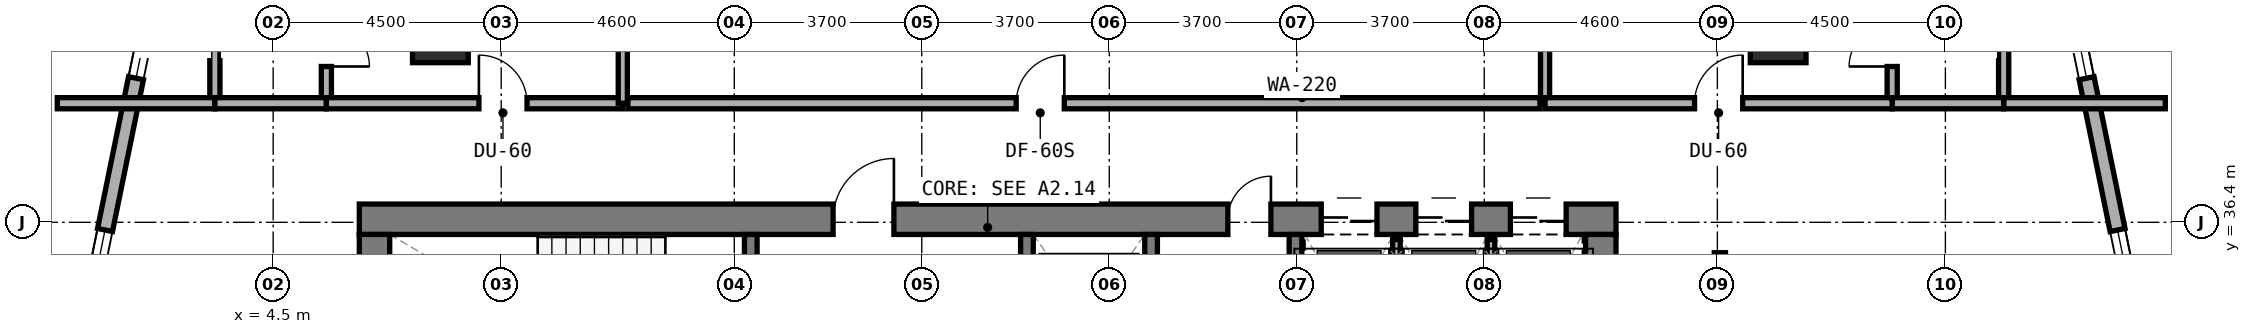
"""IFC4 building model, lengths in metres.
Left out: names, types, materials, properties, quantities, classifications, styles, units other than length and angle.
Written with IfcOpenShell. Run it as: python <this file> out.ifc"""

import sys

from ifc_helpers import new_model, si_unit, direction, frame, frame_2d, origin, origin_2d, place, context, subcontext, project, spatial, rectangle, extrude, element, fill, save


model = new_model("IFC4")
c1 = context("Model", 3, precision=1e-05, world=origin(), true_north=direction((0.0, 1.0)))
c2 = subcontext(c1, "Body", "Model", "MODEL_VIEW")
j1 = project(units=[si_unit("LENGTHUNIT", "METRE"), si_unit("PLANEANGLEUNIT", "RADIAN")], contexts=[c1])
p1 = place(None, origin())
s1 = spatial("IfcSite", under=j1, at=p1, CompositionType="ELEMENT")
p2 = place(p1, origin())
s2 = spatial("IfcBuilding", under=s1, at=p2, CompositionType="ELEMENT")
p3 = place(p2, frame((0.0, 0.0, 52.0)))
s3 = spatial("IfcBuildingStorey", under=s2, at=p3, CompositionType="ELEMENT", Elevation=52.0)
p4 = place(p3, frame((6.2, 36.46, 0.0), z_axis=(0.0, 0.0, 1.0), x_axis=(1.0, 0.0, 0.0)))
e1 = element("IfcWall", 1, at=p4, inside=s3, PredefinedType="SHEAR", context=c2, shape_type="SweptSolid", body=[
    extrude(rectangle(XDim=24.8, YDim=0.6, at=frame_2d((12.4, 0.0))), origin(), (0.0, 0.0, 1.0), 3.5),
])
p5 = place(p4, frame((9.35, 0.0, 0.0)))
e2 = element("IfcOpeningElement", 2, at=p5, cuts=e1, PredefinedType="OPENING", context=c2, shape_type="SweptSolid", body=[
    extrude(rectangle(XDim=1.2, YDim=2.15, at=frame_2d((0.6, 1.075))), frame((0.0, 0.31, 0.0), z_axis=(0.0, -1.0, 0.0), x_axis=(1.0, 0.0, 0.0)), (0.0, 0.0, 1.0), 0.62),
])
p6 = place(p4, frame((17.14, 0.0, 0.0)))
e3 = element("IfcOpeningElement", 3, at=p6, cuts=e1, PredefinedType="OPENING", context=c2, shape_type="SweptSolid", body=[
    extrude(rectangle(XDim=0.85, YDim=2.1, at=frame_2d((0.425, 1.05))), frame((0.0, 0.31, 0.0), z_axis=(0.0, -1.0, 0.0), x_axis=(1.0, 0.0, 0.0)), (0.0, 0.0, 1.0), 0.62),
])
p7 = place(p4, frame((18.983, 0.0, 0.0)))
e4 = element("IfcOpeningElement", 4, at=p7, cuts=e1, PredefinedType="OPENING", context=c2, shape_type="SweptSolid", body=[
    extrude(rectangle(XDim=1.1, YDim=2.15, at=frame_2d((0.55, 1.075))), frame((0.0, 0.31, 0.0), z_axis=(0.0, -1.0, 0.0), x_axis=(1.0, 0.0, 0.0)), (0.0, 0.0, 1.0), 0.62),
])
p8 = place(p4, frame((20.85, 0.0, 0.0)))
e5 = element("IfcOpeningElement", 5, at=p8, cuts=e1, PredefinedType="OPENING", context=c2, shape_type="SweptSolid", body=[
    extrude(rectangle(XDim=1.1, YDim=2.15, at=frame_2d((0.55, 1.075))), frame((0.0, 0.31, 0.0), z_axis=(0.0, -1.0, 0.0), x_axis=(1.0, 0.0, 0.0)), (0.0, 0.0, 1.0), 0.62),
])
p9 = place(p4, frame((22.716, 0.0, 0.0)))
e6 = element("IfcOpeningElement", 6, at=p9, cuts=e1, PredefinedType="OPENING", context=c2, shape_type="SweptSolid", body=[
    extrude(rectangle(XDim=1.1, YDim=2.15, at=frame_2d((0.55, 1.075))), frame((0.0, 0.31, 0.0), z_axis=(0.0, -1.0, 0.0), x_axis=(1.0, 0.0, 0.0)), (0.0, 0.0, 1.0), 0.62),
])
for number, where, z_axis, x_axis in (
    (7, (6.5, 33.0, 0.0), (0.0, 0.0, 1.0), (0.0, 1.0, 0.0)),
    (8, (30.7, 33.0, 0.0), (0.0, 0.0, 1.0), (0.0, 1.0, 0.0)),
):
    element("IfcWall", number, at=place(p3, frame(where, z_axis=z_axis, x_axis=x_axis)), inside=s3, PredefinedType="SHEAR", context=c2, shape_type="SweptSolid", body=[
        extrude(rectangle(XDim=3.16, YDim=0.6, at=frame_2d((1.58, 0.0))), origin(), (0.0, 0.0, 1.0), 3.5),
    ])
p10 = place(p3, frame((13.925, 33.0, 0.0), z_axis=(0.0, 0.0, 1.0), x_axis=(0.0, 1.0, 0.0)))
e9 = element("IfcWall", 9, at=p10, inside=s3, PredefinedType="STANDARD", context=c2, shape_type="SweptSolid", body=[
    extrude(rectangle(XDim=3.16, YDim=0.25, at=frame_2d((1.58, 0.0))), origin(), (0.0, 0.0, 1.0), 3.22),
])
p11 = place(p10, frame((0.98, 0.0, 0.0)))
e10 = element("IfcOpeningElement", 10, at=p11, cuts=e9, PredefinedType="OPENING", context=c2, shape_type="SweptSolid", body=[
    extrude(rectangle(XDim=1.1, YDim=2.15, at=frame_2d((0.55, 1.075))), frame((0.0, 0.135, 0.0), z_axis=(0.0, -1.0, 0.0), x_axis=(1.0, 0.0, 0.0)), (0.0, 0.0, 1.0), 0.27),
])
p12 = place(p3, frame((19.375, 33.0, 0.0), z_axis=(0.0, 0.0, 1.0), x_axis=(0.0, 1.0, 0.0)))
e11 = element("IfcWall", 11, at=p12, inside=s3, PredefinedType="STANDARD", context=c2, shape_type="SweptSolid", body=[
    extrude(rectangle(XDim=3.16, YDim=0.25, at=frame_2d((1.58, 0.0))), origin(), (0.0, 0.0, 1.0), 3.22),
])
p13 = place(p12, frame((0.98, 0.0, 0.0)))
e12 = element("IfcOpeningElement", 12, at=p13, cuts=e11, PredefinedType="OPENING", context=c2, shape_type="SweptSolid", body=[
    extrude(rectangle(XDim=1.1, YDim=2.15, at=frame_2d((0.55, 1.075))), frame((0.0, 0.135, 0.0), z_axis=(0.0, -1.0, 0.0), x_axis=(1.0, 0.0, 0.0)), (0.0, 0.0, 1.0), 0.27),
])
for number, where, z_axis, x_axis in (
    (13, (21.825, 33.0, 0.0), (0.0, 0.0, 1.0), (0.0, 1.0, 0.0)),
    (14, (24.675, 33.0, 0.0), (0.0, 0.0, 1.0), (0.0, 1.0, 0.0)),
):
    element("IfcWall", number, at=place(p3, frame(where, z_axis=z_axis, x_axis=x_axis)), inside=s3, PredefinedType="STANDARD", context=c2, shape_type="SweptSolid", body=[
        extrude(rectangle(XDim=3.16, YDim=0.25, at=frame_2d((1.58, 0.0))), origin(), (0.0, 0.0, 1.0), 3.22),
    ])
for number, where, z_axis, x_axis in (
    (15, (34.2, 40.2, 0.0), (0.0, 0.0, 1.0), (1.0, 0.0, 0.0)),
    (16, (7.8, 40.2, 0.0), (0.0, 0.0, 1.0), (1.0, 0.0, 0.0)),
):
    element("IfcColumn", number, at=place(p3, frame(where, z_axis=z_axis, x_axis=x_axis)), inside=s3, PredefinedType="COLUMN", context=c2, shape_type="SweptSolid", body=[
        extrude(rectangle(XDim=1.1, YDim=1.3, at=origin_2d()), origin(), (0.0, 0.0, 1.0), 3.5),
    ])
p14 = place(p3, frame((41.864, 31.516, 0.0), z_axis=(0.0, 0.0, 1.0), x_axis=(-0.199990901713, 0.979797754249, 0.0)))
e17 = element("IfcWall", 17, at=p14, inside=s3, PredefinedType="STANDARD", context=c2, shape_type="SweptSolid", body=[
    extrude(rectangle(XDim=10.065, YDim=0.3, at=frame_2d((5.033, 0.0))), origin(), (0.0, 0.0, 1.0), 3.22),
])
p15 = place(p14, frame((2.429, 0.0, 0.8)))
e18 = element("IfcOpeningElement", 18, at=p15, cuts=e17, PredefinedType="OPENING", context=c2, shape_type="SweptSolid", body=[
    extrude(rectangle(XDim=2.4, YDim=1.6, at=frame_2d((1.2, 0.8))), frame((0.0, 0.16, 0.0), z_axis=(0.0, -1.0, 0.0), x_axis=(1.0, 0.0, 0.0)), (0.0, 0.0, 1.0), 0.32),
])
p16 = place(p14, frame((7.887, 0.0, 0.85)))
e19 = element("IfcOpeningElement", 19, at=p16, cuts=e17, PredefinedType="OPENING", context=c2, shape_type="SweptSolid", body=[
    extrude(rectangle(XDim=1.8, YDim=1.5, at=frame_2d((0.9, 0.75))), frame((0.0, 0.16, 0.0), z_axis=(0.0, -1.0, 0.0), x_axis=(1.0, 0.0, 0.0)), (0.0, 0.0, 1.0), 0.32),
])
p17 = place(p3, frame((2.229, 41.378, 0.0), z_axis=(0.0, 0.0, 1.0), x_axis=(-0.199990901713, -0.979797754249, 0.0)))
e20 = element("IfcWall", 20, at=p17, inside=s3, PredefinedType="STANDARD", context=c2, shape_type="SweptSolid", body=[
    extrude(rectangle(XDim=10.065, YDim=0.3, at=frame_2d((5.033, 0.0))), origin(), (0.0, 0.0, 1.0), 3.22),
])
p18 = place(p17, frame((0.378, 0.0, 0.85)))
e21 = element("IfcOpeningElement", 21, at=p18, cuts=e20, PredefinedType="OPENING", context=c2, shape_type="SweptSolid", body=[
    extrude(rectangle(XDim=1.8, YDim=1.5, at=frame_2d((0.9, 0.75))), frame((0.0, 0.16, 0.0), z_axis=(0.0, -1.0, 0.0), x_axis=(1.0, 0.0, 0.0)), (0.0, 0.0, 1.0), 0.32),
])
p19 = place(p17, frame((5.236, 0.0, 0.8)))
e22 = element("IfcOpeningElement", 22, at=p19, cuts=e20, PredefinedType="OPENING", context=c2, shape_type="SweptSolid", body=[
    extrude(rectangle(XDim=2.4, YDim=1.6, at=frame_2d((1.2, 0.8))), frame((0.0, 0.16, 0.0), z_axis=(0.0, -1.0, 0.0), x_axis=(1.0, 0.0, 0.0)), (0.0, 0.0, 1.0), 0.32),
])
p20 = place(p3, frame((26.667, 33.1, 0.0), z_axis=(0.0, 0.0, 1.0), x_axis=(0.0, 1.0, 0.0)))
e23 = element("IfcWall", 23, at=p20, inside=s3, PredefinedType="PARTITIONING", context=c2, shape_type="SweptSolid", body=[
    extrude(rectangle(XDim=2.96, YDim=0.15, at=frame_2d((1.48, 0.0))), origin(), (0.0, 0.0, 1.0), 3.22),
])
p21 = place(p3, frame((28.533, 33.1, 0.0), z_axis=(0.0, 0.0, 1.0), x_axis=(0.0, 1.0, 0.0)))
e24 = element("IfcWall", 24, at=p21, inside=s3, PredefinedType="PARTITIONING", context=c2, shape_type="SweptSolid", body=[
    extrude(rectangle(XDim=2.96, YDim=0.15, at=frame_2d((1.48, 0.0))), origin(), (0.0, 0.0, 1.0), 2.395),
])
p22 = place(p3, frame((5.55, 38.85, 0.0), z_axis=(0.0, 0.0, 1.0), x_axis=(0.0, 1.0, 0.0)))
e25 = element("IfcWall", 25, at=p22, inside=s3, PredefinedType="PLUMBINGWALL", context=c2, shape_type="SweptSolid", body=[
    extrude(rectangle(XDim=2.1, YDim=0.2, at=frame_2d((1.05, 0.0))), origin(), (0.0, 0.0, 1.0), 3.22),
])
p23 = place(p22, frame((0.625, 0.0, 0.0)))
e26 = element("IfcOpeningElement", 26, at=p23, cuts=e25, PredefinedType="OPENING", context=c2, shape_type="SweptSolid", body=[
    extrude(rectangle(XDim=0.85, YDim=2.1, at=frame_2d((0.425, 1.05))), frame((0.0, 0.11, 0.0), z_axis=(0.0, -1.0, 0.0), x_axis=(1.0, 0.0, 0.0)), (0.0, 0.0, 1.0), 0.22),
])
p24 = place(p3, frame((3.35, 38.85, 0.0), z_axis=(0.0, 0.0, 1.0), x_axis=(0.0, 1.0, 0.0)))
e27 = element("IfcWall", 27, at=p24, inside=s3, PredefinedType="PLUMBINGWALL", context=c2, shape_type="SweptSolid", body=[
    extrude(rectangle(XDim=2.1, YDim=0.2, at=frame_2d((1.05, 0.0))), origin(), (0.0, 0.0, 1.0), 3.22),
])
p25 = place(p3, frame((0.24, 38.75, 0.0), z_axis=(0.0, 0.0, 1.0), x_axis=(1.0, 0.0, 0.0)))
e28 = element("IfcWall", 28, at=p25, inside=s3, PredefinedType="SOLIDWALL", context=c2, shape_type="SweptSolid", body=[
    extrude(rectangle(XDim=3.11, YDim=0.22, at=frame_2d((1.555, 0.0))), origin(), (0.0, 0.0, 1.0), 3.22),
])
p26 = place(p3, frame((3.35, 38.75, 0.0), z_axis=(0.0, 0.0, 1.0), x_axis=(1.0, 0.0, 0.0)))
e29 = element("IfcWall", 29, at=p26, inside=s3, PredefinedType="SOLIDWALL", context=c2, shape_type="SweptSolid", body=[
    extrude(rectangle(XDim=2.2, YDim=0.22, at=frame_2d((1.1, 0.0))), origin(), (0.0, 0.0, 1.0), 3.22),
])
p27 = place(p3, frame((5.55, 38.75, 0.0), z_axis=(0.0, 0.0, 1.0), x_axis=(1.0, 0.0, 0.0)))
e30 = element("IfcWall", 30, at=p27, inside=s3, PredefinedType="SOLIDWALL", context=c2, shape_type="SweptSolid", body=[
    extrude(rectangle(XDim=5.85, YDim=0.22, at=frame_2d((2.925, 0.0))), origin(), (0.0, 0.0, 1.0), 2.395),
])
p28 = place(p27, frame((3.01, 0.0, 0.0)))
e31 = element("IfcOpeningElement", 31, at=p28, cuts=e30, PredefinedType="OPENING", context=c2, shape_type="SweptSolid", body=[
    extrude(rectangle(XDim=0.95, YDim=2.1, at=frame_2d((0.475, 1.05))), frame((0.0, 0.12, 0.0), z_axis=(0.0, -1.0, 0.0), x_axis=(1.0, 0.0, 0.0)), (0.0, 0.0, 1.0), 0.24),
])
p29 = place(p3, frame((11.4, 38.75, 0.0), z_axis=(0.0, 0.0, 1.0), x_axis=(0.0, 1.0, 0.0)))
e32 = element("IfcWall", 32, at=p29, inside=s3, PredefinedType="SOLIDWALL", context=c2, shape_type="SweptSolid", body=[
    extrude(rectangle(XDim=7.45, YDim=0.18, at=frame_2d((3.725, 0.0))), origin(), (0.0, 0.0, 1.0), 2.745),
])
p30 = place(p3, frame((11.5, 38.75, 0.0), z_axis=(0.0, 0.0, 1.0), x_axis=(1.0, 0.0, 0.0)))
e33 = element("IfcWall", 33, at=p30, inside=s3, PredefinedType="SOLIDWALL", context=c2, shape_type="SweptSolid", body=[
    extrude(rectangle(XDim=18.0, YDim=0.22, at=frame_2d((9.0, 0.0))), origin(), (0.0, 0.0, 1.0), 2.395),
])
p31 = place(p30, frame((7.663, 0.0, 0.0)))
e34 = element("IfcOpeningElement", 34, at=p31, cuts=e33, PredefinedType="OPENING", context=c2, shape_type="SweptSolid", body=[
    extrude(rectangle(XDim=0.95, YDim=2.1, at=frame_2d((0.475, 1.05))), frame((0.0, 0.12, 0.0), z_axis=(0.0, -1.0, 0.0), x_axis=(1.0, 0.0, 0.0)), (0.0, 0.0, 1.0), 0.24),
])
p32 = place(p3, frame((29.6, 38.75, 0.0), z_axis=(0.0, 0.0, 1.0), x_axis=(0.0, 1.0, 0.0)))
e35 = element("IfcWall", 35, at=p32, inside=s3, PredefinedType="SOLIDWALL", context=c2, shape_type="SweptSolid", body=[
    extrude(rectangle(XDim=7.688, YDim=0.18, at=frame_2d((3.844, 0.0))), origin(), (0.0, 0.0, 1.0), 2.745),
])
p33 = place(p3, frame((36.45, 38.85, 0.0), z_axis=(0.0, 0.0, 1.0), x_axis=(0.0, 1.0, 0.0)))
e36 = element("IfcWall", 36, at=p33, inside=s3, PredefinedType="PLUMBINGWALL", context=c2, shape_type="SweptSolid", body=[
    extrude(rectangle(XDim=2.1, YDim=0.2, at=frame_2d((1.05, 0.0))), origin(), (0.0, 0.0, 1.0), 3.22),
])
p34 = place(p33, frame((0.625, 0.0, 0.0)))
e37 = element("IfcOpeningElement", 37, at=p34, cuts=e36, PredefinedType="OPENING", context=c2, shape_type="SweptSolid", body=[
    extrude(rectangle(XDim=0.85, YDim=2.1, at=frame_2d((0.425, 1.05))), frame((0.0, 0.11, 0.0), z_axis=(0.0, -1.0, 0.0), x_axis=(1.0, 0.0, 0.0)), (0.0, 0.0, 1.0), 0.22),
])
p35 = place(p3, frame((38.65, 38.85, 0.0), z_axis=(0.0, 0.0, 1.0), x_axis=(0.0, 1.0, 0.0)))
e38 = element("IfcWall", 38, at=p35, inside=s3, PredefinedType="PLUMBINGWALL", context=c2, shape_type="SweptSolid", body=[
    extrude(rectangle(XDim=2.1, YDim=0.2, at=frame_2d((1.05, 0.0))), origin(), (0.0, 0.0, 1.0), 3.22),
])
p36 = place(p3, frame((38.65, 38.75, 0.0), z_axis=(0.0, 0.0, 1.0), x_axis=(1.0, 0.0, 0.0)))
e39 = element("IfcWall", 39, at=p36, inside=s3, PredefinedType="SOLIDWALL", context=c2, shape_type="SweptSolid", body=[
    extrude(rectangle(XDim=3.19, YDim=0.22, at=frame_2d((1.595, 0.0))), origin(), (0.0, 0.0, 1.0), 3.22),
])
p37 = place(p3, frame((36.45, 38.75, 0.0), z_axis=(0.0, 0.0, 1.0), x_axis=(1.0, 0.0, 0.0)))
e40 = element("IfcWall", 40, at=p37, inside=s3, PredefinedType="SOLIDWALL", context=c2, shape_type="SweptSolid", body=[
    extrude(rectangle(XDim=2.2, YDim=0.22, at=frame_2d((1.1, 0.0))), origin(), (0.0, 0.0, 1.0), 3.22),
])
p38 = place(p3, frame((29.6, 38.75, 0.0), z_axis=(0.0, 0.0, 1.0), x_axis=(1.0, 0.0, 0.0)))
e41 = element("IfcWall", 41, at=p38, inside=s3, PredefinedType="SOLIDWALL", context=c2, shape_type="SweptSolid", body=[
    extrude(rectangle(XDim=6.85, YDim=0.22, at=frame_2d((3.425, 0.0))), origin(), (0.0, 0.0, 1.0), 2.395),
])
p39 = place(p38, frame((2.95, 0.0, 0.0)))
e42 = element("IfcOpeningElement", 42, at=p39, cuts=e41, PredefinedType="OPENING", context=c2, shape_type="SweptSolid", body=[
    extrude(rectangle(XDim=0.95, YDim=2.1, at=frame_2d((0.475, 1.05))), frame((0.0, 0.12, 0.0), z_axis=(0.0, -1.0, 0.0), x_axis=(1.0, 0.0, 0.0)), (0.0, 0.0, 1.0), 0.24),
])
p40 = place(p3, frame((33.05, 33.6, 0.0), z_axis=(0.0, 0.0, 1.0), x_axis=(0.0, 1.0, 0.0)))
e43 = element("IfcWall", 43, at=p40, inside=s3, PredefinedType="SOLIDWALL", context=c2, shape_type="SweptSolid", body=[
    extrude(rectangle(XDim=2.2, YDim=0.22, at=frame_2d((1.1, 0.0))), origin(), (0.0, 0.0, 1.0), 3.22),
])
p41 = place(p15, origin())
e44 = element("IfcWindow", 44, at=p41, inside=s3, PartitioningType="SINGLE_PANEL", PredefinedType="WINDOW", context=c2, shape_type="SweptSolid", body=[
    extrude(rectangle(XDim=2.4, YDim=1.6, at=frame_2d((1.2, 0.8))), frame((0.0, 0.03, 0.0), z_axis=(0.0, -1.0, 0.0), x_axis=(1.0, 0.0, 0.0)), (0.0, 0.0, 1.0), 0.06),
])
fill(e18, e44)
p42 = place(p16, origin())
e45 = element("IfcWindow", 45, at=p42, inside=s3, PartitioningType="SINGLE_PANEL", PredefinedType="WINDOW", context=c2, shape_type="SweptSolid", body=[
    extrude(rectangle(XDim=1.8, YDim=1.5, at=frame_2d((0.9, 0.75))), frame((0.0, 0.03, 0.0), z_axis=(0.0, -1.0, 0.0), x_axis=(1.0, 0.0, 0.0)), (0.0, 0.0, 1.0), 0.06),
])
fill(e19, e45)
p43 = place(p18, origin())
e46 = element("IfcWindow", 46, at=p43, inside=s3, PartitioningType="SINGLE_PANEL", PredefinedType="WINDOW", context=c2, shape_type="SweptSolid", body=[
    extrude(rectangle(XDim=1.8, YDim=1.5, at=frame_2d((0.9, 0.75))), frame((0.0, 0.03, 0.0), z_axis=(0.0, -1.0, 0.0), x_axis=(1.0, 0.0, 0.0)), (0.0, 0.0, 1.0), 0.06),
])
fill(e21, e46)
p44 = place(p19, origin())
e47 = element("IfcWindow", 47, at=p44, inside=s3, PartitioningType="SINGLE_PANEL", PredefinedType="WINDOW", context=c2, shape_type="SweptSolid", body=[
    extrude(rectangle(XDim=2.4, YDim=1.6, at=frame_2d((1.2, 0.8))), frame((0.0, 0.03, 0.0), z_axis=(0.0, -1.0, 0.0), x_axis=(1.0, 0.0, 0.0)), (0.0, 0.0, 1.0), 0.06),
])
fill(e22, e47)
p45 = place(p5, origin())
e48 = element("IfcDoor", 48, at=p45, inside=s3, OperationType="SINGLE_SWING_RIGHT", PredefinedType="DOOR", context=c2, shape_type="SweptSolid", body=[
    extrude(rectangle(XDim=1.2, YDim=2.15, at=frame_2d((0.6, 1.075))), frame((0.0, 0.025, 0.0), z_axis=(0.0, -1.0, 0.0), x_axis=(1.0, 0.0, 0.0)), (0.0, 0.0, 1.0), 0.05),
])
fill(e2, e48)
p46 = place(p6, origin())
e49 = element("IfcDoor", 49, at=p46, inside=s3, OperationType="SINGLE_SWING_RIGHT", PredefinedType="DOOR", context=c2, shape_type="SweptSolid", body=[
    extrude(rectangle(XDim=0.85, YDim=2.1, at=frame_2d((0.425, 1.05))), frame((0.0, 0.025, 0.0), z_axis=(0.0, -1.0, 0.0), x_axis=(1.0, 0.0, 0.0)), (0.0, 0.0, 1.0), 0.05),
])
fill(e3, e49)
p47 = place(p7, origin())
e50 = element("IfcDoor", 50, at=p47, inside=s3, OperationType="DOUBLE_DOOR_SLIDING", PredefinedType="DOOR", context=c2, shape_type="SweptSolid", body=[
    extrude(rectangle(XDim=1.1, YDim=2.15, at=frame_2d((0.55, 1.075))), frame((0.0, 0.025, 0.0), z_axis=(0.0, -1.0, 0.0), x_axis=(1.0, 0.0, 0.0)), (0.0, 0.0, 1.0), 0.05),
])
fill(e4, e50)
p48 = place(p8, origin())
e51 = element("IfcDoor", 51, at=p48, inside=s3, OperationType="DOUBLE_DOOR_SLIDING", PredefinedType="DOOR", context=c2, shape_type="SweptSolid", body=[
    extrude(rectangle(XDim=1.1, YDim=2.15, at=frame_2d((0.55, 1.075))), frame((0.0, 0.025, 0.0), z_axis=(0.0, -1.0, 0.0), x_axis=(1.0, 0.0, 0.0)), (0.0, 0.0, 1.0), 0.05),
])
fill(e5, e51)
p49 = place(p9, origin())
e52 = element("IfcDoor", 52, at=p49, inside=s3, OperationType="DOUBLE_DOOR_SLIDING", PredefinedType="DOOR", context=c2, shape_type="SweptSolid", body=[
    extrude(rectangle(XDim=1.1, YDim=2.15, at=frame_2d((0.55, 1.075))), frame((0.0, 0.025, 0.0), z_axis=(0.0, -1.0, 0.0), x_axis=(1.0, 0.0, 0.0)), (0.0, 0.0, 1.0), 0.05),
])
fill(e6, e52)
p50 = place(p23, frame((0.85, 0.0, 0.0), z_axis=(0.0, 0.0, 1.0), x_axis=(-1.0, 0.0, 0.0)))
e53 = element("IfcDoor", 53, at=p50, inside=s3, OperationType="SINGLE_SWING_RIGHT", PredefinedType="DOOR", context=c2, shape_type="SweptSolid", body=[
    extrude(rectangle(XDim=0.85, YDim=2.1, at=frame_2d((0.425, 1.05))), frame((0.0, 0.025, 0.0), z_axis=(0.0, -1.0, 0.0), x_axis=(1.0, 0.0, 0.0)), (0.0, 0.0, 1.0), 0.05),
])
fill(e26, e53)
p51 = place(p28, origin())
e54 = element("IfcDoor", 54, at=p51, inside=s3, OperationType="SINGLE_SWING_LEFT", PredefinedType="DOOR", context=c2, shape_type="SweptSolid", body=[
    extrude(rectangle(XDim=0.95, YDim=2.1, at=frame_2d((0.475, 1.05))), frame((0.0, 0.025, 0.0), z_axis=(0.0, -1.0, 0.0), x_axis=(1.0, 0.0, 0.0)), (0.0, 0.0, 1.0), 0.05),
])
fill(e31, e54)
p52 = place(p31, origin())
e55 = element("IfcDoor", 55, at=p52, inside=s3, OperationType="SINGLE_SWING_RIGHT", PredefinedType="DOOR", context=c2, shape_type="SweptSolid", body=[
    extrude(rectangle(XDim=0.95, YDim=2.1, at=frame_2d((0.475, 1.05))), frame((0.0, 0.025, 0.0), z_axis=(0.0, -1.0, 0.0), x_axis=(1.0, 0.0, 0.0)), (0.0, 0.0, 1.0), 0.05),
])
fill(e34, e55)
p53 = place(p34, origin())
e56 = element("IfcDoor", 56, at=p53, inside=s3, OperationType="SINGLE_SWING_LEFT", PredefinedType="DOOR", context=c2, shape_type="SweptSolid", body=[
    extrude(rectangle(XDim=0.85, YDim=2.1, at=frame_2d((0.425, 1.05))), frame((0.0, 0.025, 0.0), z_axis=(0.0, -1.0, 0.0), x_axis=(1.0, 0.0, 0.0)), (0.0, 0.0, 1.0), 0.05),
])
fill(e37, e56)
p54 = place(p39, origin())
e57 = element("IfcDoor", 57, at=p54, inside=s3, OperationType="SINGLE_SWING_RIGHT", PredefinedType="DOOR", context=c2, shape_type="SweptSolid", body=[
    extrude(rectangle(XDim=0.95, YDim=2.1, at=frame_2d((0.475, 1.05))), frame((0.0, 0.025, 0.0), z_axis=(0.0, -1.0, 0.0), x_axis=(1.0, 0.0, 0.0)), (0.0, 0.0, 1.0), 0.05),
])
fill(e42, e57)
save(model, sys.argv[1])
